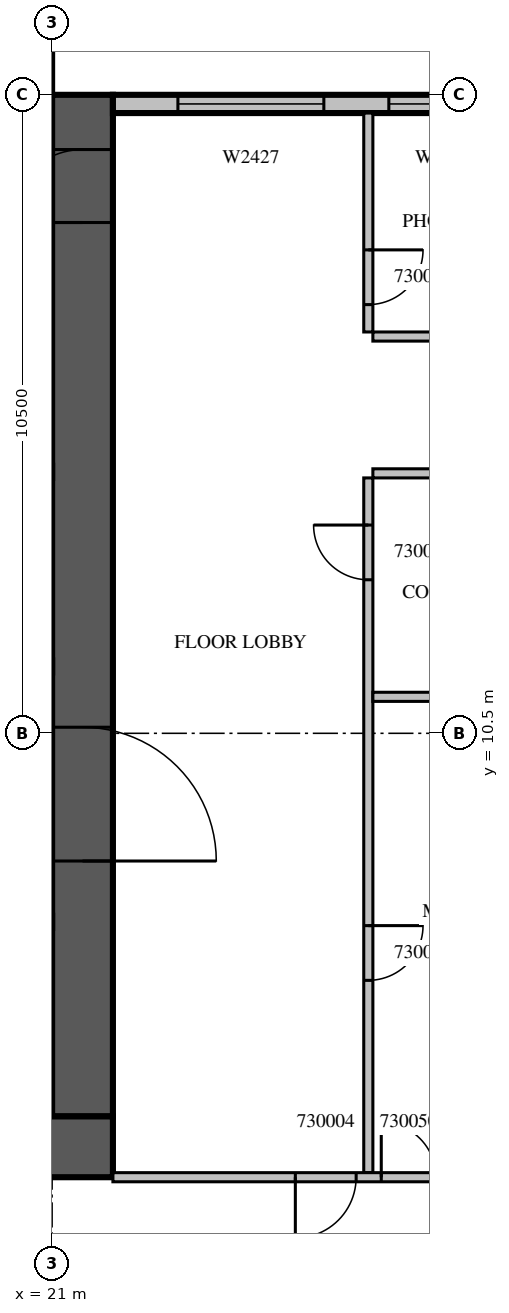
"""IFC4 building model, lengths in metres.
Left out: names, types, materials, properties, quantities, classifications, styles, units other than length and angle.
Written with IfcOpenShell. Run it as: python <this file> out.ifc"""

import sys

from ifc_helpers import new_model, si_unit, direction, frame, frame_2d, origin, place, context, subcontext, project, spatial, rectangle, extrude, source, transform, mapped, element, fill, save


model = new_model("IFC4")
c1 = context("Model", 3, precision=1e-05, world=origin(), true_north=direction((0.0, 1.0)))
c2 = subcontext(c1, "Body", "Model", "MODEL_VIEW")
j1 = project(units=[si_unit("LENGTHUNIT", "METRE"), si_unit("PLANEANGLEUNIT", "RADIAN")], contexts=[c1])
p1 = place(None, origin())
s1 = spatial("IfcSite", under=j1, at=p1, CompositionType="ELEMENT")
p2 = place(p1, origin())
s2 = spatial("IfcBuilding", under=s1, at=p2, CompositionType="ELEMENT")
p3 = place(p2, frame((0.0, 0.0, 137.1)))
s3 = spatial("IfcBuildingStorey", under=s2, at=p3, CompositionType="ELEMENT", Elevation=137.1)
m1 = source(origin(), c2, "Body", "SweptSolid", [
    extrude(rectangle(XDim=16.8, YDim=1.0, at=frame_2d((8.4, 0.0))), origin(), (0.0, 0.0, 1.0), 4.2),
])
p4 = place(p3, frame((21.5, 4.2, 0.0), z_axis=(0.0, 0.0, 1.0), x_axis=(0.0, 1.0, 0.0)))
e1 = element("IfcWall", 1, at=p4, inside=s3, PredefinedType="SHEAR", context=c2, shape_type="MappedRepresentation", body=[
    mapped(m1, transform((0.0, 0.0, 0.0), scale=1.0)),
])
m2 = source(origin(), c2, "Body", "SweptSolid", [
    extrude(rectangle(XDim=2.2, YDim=2.1, at=frame_2d((1.1, 1.05))), frame((0.0, 0.51, 0.0), z_axis=(0.0, -1.0, 0.0), x_axis=(1.0, 0.0, 0.0)), (0.0, 0.0, 1.0), 1.02),
])
p5 = place(p4, frame((4.2, 0.0, 0.0)))
e2 = element("IfcOpeningElement", 2, at=p5, cuts=e1, PredefinedType="OPENING", context=c2, shape_type="MappedRepresentation", body=[
    mapped(m2, transform((0.0, 0.0, 0.0), scale=1.0)),
])
m3 = source(origin(), c2, "Body", "SweptSolid", [
    extrude(rectangle(XDim=1.2, YDim=2.1, at=frame_2d((0.6, 1.05))), frame((0.0, 0.51, 0.0), z_axis=(0.0, -1.0, 0.0), x_axis=(1.0, 0.0, 0.0)), (0.0, 0.0, 1.0), 1.02),
])
p6 = place(p4, frame((14.7, 0.0, 0.0)))
e3 = element("IfcOpeningElement", 3, at=p6, cuts=e1, PredefinedType="OPENING", context=c2, shape_type="MappedRepresentation", body=[
    mapped(m3, transform((0.0, 0.0, 0.0), scale=1.0)),
])
m4 = source(origin(), c2, "Body", "SweptSolid", [
    extrude(rectangle(XDim=17.8, YDim=1.0, at=frame_2d((8.9, 0.0))), origin(), (0.0, 0.0, 1.0), 4.2),
])
p7 = place(p3, frame((4.2, 3.7, 0.0), z_axis=(0.0, 0.0, 1.0), x_axis=(1.0, 0.0, 0.0)))
e4 = element("IfcWall", 4, at=p7, inside=s3, PredefinedType="SHEAR", context=c2, shape_type="MappedRepresentation", body=[
    mapped(m4, transform((0.0, 0.0, 0.0), scale=1.0)),
])
m5 = source(origin(), c2, "Body", "SweptSolid", [
    extrude(rectangle(XDim=6.875, YDim=0.3, at=frame_2d((3.438, 0.0))), origin(), (0.0, 0.0, 1.0), 3.8),
])
p8 = place(p3, frame((28.875, 20.85, 0.0), z_axis=(0.0, 0.0, 1.0), x_axis=(-1.0, 0.0, 0.0)))
e5 = element("IfcWall", 5, at=p8, inside=s3, PredefinedType="STANDARD", context=c2, shape_type="MappedRepresentation", body=[
    mapped(m5, transform((0.0, 0.0, 0.0), scale=1.0)),
])
m6 = source(origin(), c2, "Body", "SweptSolid", [
    extrude(rectangle(XDim=1.8, YDim=2.7, at=frame_2d((0.9, 1.35))), frame((0.0, 0.16, 0.0), z_axis=(0.0, -1.0, 0.0), x_axis=(1.0, 0.0, 0.0)), (0.0, 0.0, 1.0), 0.32),
])
p9 = place(p8, frame((0.537, 0.0, 0.6)))
e6 = element("IfcOpeningElement", 6, at=p9, cuts=e5, PredefinedType="OPENING", context=c2, shape_type="MappedRepresentation", body=[
    mapped(m6, transform((0.0, 0.0, 0.0), scale=1.0)),
])
m7 = source(origin(), c2, "Body", "SweptSolid", [
    extrude(rectangle(XDim=2.4, YDim=2.7, at=frame_2d((1.2, 1.35))), frame((0.0, 0.16, 0.0), z_axis=(0.0, -1.0, 0.0), x_axis=(1.0, 0.0, 0.0)), (0.0, 0.0, 1.0), 0.32),
])
p10 = place(p8, frame((3.406, 0.0, 0.6)))
e7 = element("IfcOpeningElement", 7, at=p10, cuts=e5, PredefinedType="OPENING", context=c2, shape_type="MappedRepresentation", body=[
    mapped(m7, transform((0.0, 0.0, 0.0), scale=1.0)),
])
m8 = source(origin(), c2, "Body", "SweptSolid", [
    extrude(rectangle(XDim=11.425, YDim=0.15, at=frame_2d((5.713, 0.0))), origin(), (0.0, 0.0, 1.0), 3.8),
])
p11 = place(p3, frame((26.2, 14.7, 0.0), z_axis=(0.0, 0.0, 1.0), x_axis=(0.0, -1.0, 0.0)))
e8 = element("IfcWall", 8, at=p11, inside=s3, PredefinedType="PARTITIONING", context=c2, shape_type="MappedRepresentation", body=[
    mapped(m8, transform((0.0, 0.0, 0.0), scale=1.0)),
])
m9 = source(origin(), c2, "Body", "SweptSolid", [
    extrude(rectangle(XDim=0.9, YDim=2.1, at=frame_2d((0.45, 1.05))), frame((0.0, 0.085, 0.0), z_axis=(0.0, -1.0, 0.0), x_axis=(1.0, 0.0, 0.0)), (0.0, 0.0, 1.0), 0.17),
])
p12 = place(p11, frame((7.362, 0.0, 0.0)))
e9 = element("IfcOpeningElement", 9, at=p12, cuts=e8, PredefinedType="OPENING", context=c2, shape_type="MappedRepresentation", body=[
    mapped(m9, transform((0.0, 0.0, 0.0), scale=1.0)),
])
p13 = place(p11, frame((0.775, 0.0, 0.0)))
e10 = element("IfcOpeningElement", 10, at=p13, cuts=e8, PredefinedType="OPENING", context=c2, shape_type="MappedRepresentation", body=[
    mapped(m9, transform((0.0, 0.0, 0.0), scale=1.0)),
])
m10 = source(origin(), c2, "Body", "SweptSolid", [
    extrude(rectangle(XDim=3.6, YDim=0.15, at=frame_2d((1.8, 0.0))), origin(), (0.0, 0.0, 1.0), 3.8),
])
p14 = place(p3, frame((26.2, 20.7, 0.0), z_axis=(0.0, 0.0, 1.0), x_axis=(0.0, -1.0, 0.0)))
e11 = element("IfcWall", 11, at=p14, inside=s3, PredefinedType="PARTITIONING", context=c2, shape_type="MappedRepresentation", body=[
    mapped(m10, transform((0.0, 0.0, 0.0), scale=1.0)),
])
p15 = place(p14, frame((2.25, 0.0, 0.0)))
e12 = element("IfcOpeningElement", 12, at=p15, cuts=e11, PredefinedType="OPENING", context=c2, shape_type="MappedRepresentation", body=[
    mapped(m9, transform((0.0, 0.0, 0.0), scale=1.0)),
])
m11 = source(origin(), c2, "Body", "SweptSolid", [
    extrude(rectangle(XDim=3.05, YDim=0.15, at=frame_2d((1.525, 0.0))), origin(), (0.0, 0.0, 1.0), 3.8),
])
for number, where, z_axis, x_axis in (
    (13, (29.325, 11.1, 0.0), (0.0, 0.0, 1.0), (-1.0, 0.0, 0.0)),
    (14, (29.325, 14.775, 0.0), (0.0, 0.0, 1.0), (-1.0, 0.0, 0.0)),
    (15, (26.275, 17.025, 0.0), (0.0, 0.0, 1.0), (1.0, 0.0, 0.0)),
):
    element("IfcWall", number, at=place(p3, frame(where, z_axis=z_axis, x_axis=x_axis)), inside=s3, PredefinedType="PARTITIONING", context=c2, shape_type="MappedRepresentation", body=[
        mapped(m11, transform((0.0, 0.0, 0.0), scale=1.0)),
    ])
m12 = source(origin(), c2, "Body", "SweptSolid", [
    extrude(rectangle(XDim=7.325, YDim=0.15, at=frame_2d((3.663, 0.0))), origin(), (0.0, 0.0, 1.0), 3.8),
])
p16 = place(p3, frame((22.0, 3.2, 0.0), z_axis=(0.0, 0.0, 1.0), x_axis=(1.0, 0.0, 0.0)))
e16 = element("IfcWall", 16, at=p16, inside=s3, PredefinedType="PARTITIONING", context=c2, shape_type="MappedRepresentation", body=[
    mapped(m12, transform((0.0, 0.0, 0.0), scale=1.0)),
])
m13 = source(origin(), c2, "Body", "SweptSolid", [
    extrude(rectangle(XDim=1.0, YDim=2.1, at=frame_2d((0.5, 1.05))), frame((0.0, 0.085, 0.0), z_axis=(0.0, -1.0, 0.0), x_axis=(1.0, 0.0, 0.0)), (0.0, 0.0, 1.0), 0.17),
])
p17 = place(p16, frame((3.0, 0.0, 0.0)))
e17 = element("IfcOpeningElement", 17, at=p17, cuts=e16, PredefinedType="OPENING", context=c2, shape_type="MappedRepresentation", body=[
    mapped(m13, transform((0.0, 0.0, 0.0), scale=1.0)),
])
p18 = place(p16, frame((4.413, 0.0, 0.0)))
e18 = element("IfcOpeningElement", 18, at=p18, cuts=e16, PredefinedType="OPENING", context=c2, shape_type="MappedRepresentation", body=[
    mapped(m9, transform((0.0, 0.0, 0.0), scale=1.0)),
])
m14 = source(origin(), c2, "Body", "SweptSolid", [
    extrude(rectangle(XDim=1.8, YDim=2.7, at=frame_2d((0.9, 1.35))), frame((0.0, 0.03, 0.0), z_axis=(0.0, -1.0, 0.0), x_axis=(1.0, 0.0, 0.0)), (0.0, 0.0, 1.0), 0.06),
])
p19 = place(p9, origin())
e19 = element("IfcWindow", 19, at=p19, inside=s3, PartitioningType="SINGLE_PANEL", PredefinedType="WINDOW", context=c2, shape_type="MappedRepresentation", body=[
    mapped(m14, transform((0.0, 0.0, 0.0), scale=1.0)),
])
fill(e6, e19)
m15 = source(origin(), c2, "Body", "SweptSolid", [
    extrude(rectangle(XDim=2.4, YDim=2.7, at=frame_2d((1.2, 1.35))), frame((0.0, 0.03, 0.0), z_axis=(0.0, -1.0, 0.0), x_axis=(1.0, 0.0, 0.0)), (0.0, 0.0, 1.0), 0.06),
])
p20 = place(p10, origin())
e20 = element("IfcWindow", 20, at=p20, inside=s3, PartitioningType="SINGLE_PANEL", PredefinedType="WINDOW", context=c2, shape_type="MappedRepresentation", body=[
    mapped(m15, transform((0.0, 0.0, 0.0), scale=1.0)),
])
fill(e7, e20)
m16 = source(origin(), c2, "Body", "SweptSolid", [
    extrude(rectangle(XDim=2.2, YDim=2.1, at=frame_2d((1.1, 1.05))), frame((0.0, 0.025, 0.0), z_axis=(0.0, -1.0, 0.0), x_axis=(1.0, 0.0, 0.0)), (0.0, 0.0, 1.0), 0.05),
])
p21 = place(p5, origin())
e21 = element("IfcDoor", 21, at=p21, inside=s3, OperationType="DOUBLE_DOOR_SINGLE_SWING", PredefinedType="DOOR", context=c2, shape_type="MappedRepresentation", body=[
    mapped(m16, transform((0.0, 0.0, 0.0), scale=1.0)),
])
fill(e2, e21)
m17 = source(origin(), c2, "Body", "SweptSolid", [
    extrude(rectangle(XDim=1.2, YDim=2.1, at=frame_2d((0.6, 1.05))), frame((0.0, 0.025, 0.0), z_axis=(0.0, -1.0, 0.0), x_axis=(1.0, 0.0, 0.0)), (0.0, 0.0, 1.0), 0.05),
])
p22 = place(p6, origin())
e22 = element("IfcDoor", 22, at=p22, inside=s3, OperationType="SINGLE_SWING_LEFT", PredefinedType="DOOR", context=c2, shape_type="MappedRepresentation", body=[
    mapped(m17, transform((0.0, 0.0, 0.0), scale=1.0)),
])
fill(e3, e22)
m18 = source(origin(), c2, "Body", "SweptSolid", [
    extrude(rectangle(XDim=0.9, YDim=2.1, at=frame_2d((0.45, 1.05))), frame((0.0, 0.025, 0.0), z_axis=(0.0, -1.0, 0.0), x_axis=(1.0, 0.0, 0.0)), (0.0, 0.0, 1.0), 0.05),
])
p23 = place(p12, origin())
e23 = element("IfcDoor", 23, at=p23, inside=s3, OperationType="SINGLE_SWING_LEFT", PredefinedType="DOOR", context=c2, shape_type="MappedRepresentation", body=[
    mapped(m18, transform((0.0, 0.0, 0.0), scale=1.0)),
])
fill(e9, e23)
p24 = place(p13, origin())
e24 = element("IfcDoor", 24, at=p24, inside=s3, OperationType="SINGLE_SWING_RIGHT", PredefinedType="DOOR", context=c2, shape_type="MappedRepresentation", body=[
    mapped(m18, transform((0.0, 0.0, 0.0), scale=1.0)),
])
fill(e10, e24)
p25 = place(p15, origin())
e25 = element("IfcDoor", 25, at=p25, inside=s3, OperationType="SINGLE_SWING_LEFT", PredefinedType="DOOR", context=c2, shape_type="MappedRepresentation", body=[
    mapped(m18, transform((0.0, 0.0, 0.0), scale=1.0)),
])
fill(e12, e25)
m19 = source(origin(), c2, "Body", "SweptSolid", [
    extrude(rectangle(XDim=1.0, YDim=2.1, at=frame_2d((0.5, 1.05))), frame((0.0, 0.025, 0.0), z_axis=(0.0, -1.0, 0.0), x_axis=(1.0, 0.0, 0.0)), (0.0, 0.0, 1.0), 0.05),
])
p26 = place(p17, origin())
e26 = element("IfcDoor", 26, at=p26, inside=s3, OperationType="SINGLE_SWING_RIGHT", PredefinedType="DOOR", context=c2, shape_type="MappedRepresentation", body=[
    mapped(m19, transform((0.0, 0.0, 0.0), scale=1.0)),
])
fill(e17, e26)
p27 = place(p18, origin())
e27 = element("IfcDoor", 27, at=p27, inside=s3, OperationType="SINGLE_SWING_LEFT", PredefinedType="DOOR", context=c2, shape_type="MappedRepresentation", body=[
    mapped(m18, transform((0.0, 0.0, 0.0), scale=1.0)),
])
fill(e18, e27)
save(model, sys.argv[1])
